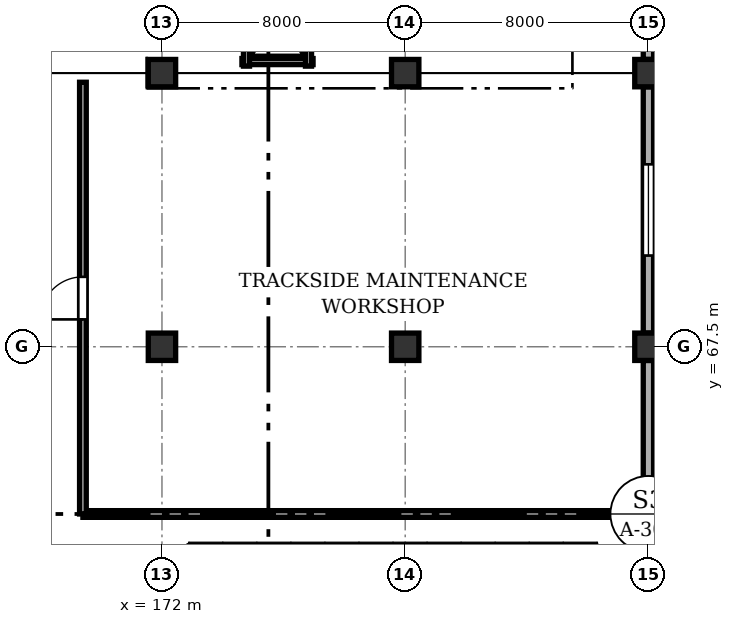
"""IFC4 building model, lengths in metres.
Left out: names, types, materials, properties, quantities, classifications, styles, units other than length and angle.
Written with IfcOpenShell. Run it as: python <this file> out.ifc"""

import sys

from ifc_helpers import new_model, si_unit, direction, frame, frame_2d, origin, origin_2d, place, context, subcontext, project, spatial, rectangle, extrude, element, fill, save


model = new_model("IFC4")
c1 = context("Model", 3, precision=1e-05, world=origin(), true_north=direction((0.0, 1.0)))
c2 = subcontext(c1, "Body", "Model", "MODEL_VIEW")
j1 = project(units=[si_unit("LENGTHUNIT", "METRE"), si_unit("PLANEANGLEUNIT", "RADIAN")], contexts=[c1])
p1 = place(None, origin())
s1 = spatial("IfcSite", under=j1, at=p1, CompositionType="ELEMENT")
p2 = place(p1, origin())
s2 = spatial("IfcBuilding", under=s1, at=p2, CompositionType="ELEMENT")
p3 = place(p2, origin())
s3 = spatial("IfcBuildingStorey", under=s2, at=p3, CompositionType="ELEMENT", Elevation=0.0)
for number, where, z_axis, x_axis in (
    (1, (172.0, 67.5, 0.0), (0.0, 0.0, 1.0), (1.0, 0.0, 0.0)),
    (2, (172.0, 76.5, 0.0), (0.0, 0.0, 1.0), (1.0, 0.0, 0.0)),
    (3, (180.0, 67.5, 0.0), (0.0, 0.0, 1.0), (1.0, 0.0, 0.0)),
    (4, (180.0, 76.5, 0.0), (0.0, 0.0, 1.0), (1.0, 0.0, 0.0)),
    (5, (188.0, 67.5, 0.0), (0.0, 0.0, 1.0), (1.0, 0.0, 0.0)),
    (6, (188.0, 76.5, 0.0), (0.0, 0.0, 1.0), (1.0, 0.0, 0.0)),
):
    element("IfcColumn", number, at=place(p3, frame(where, z_axis=z_axis, x_axis=x_axis)), inside=s3, PredefinedType="COLUMN", context=c2, shape_type="SweptSolid", body=[
        extrude(rectangle(XDim=0.9, YDim=0.9, at=origin_2d()), origin(), (0.0, 0.0, 1.0), 6.6),
    ])
p4 = place(p3, frame((188.0, 67.05, 0.0), z_axis=(0.0, 0.0, 1.0), x_axis=(0.0, -1.0, 0.0)))
e7 = element("IfcWall", 7, at=p4, inside=s3, PredefinedType="SOLIDWALL", context=c2, shape_type="SweptSolid", body=[
    extrude(rectangle(XDim=12.65, YDim=0.34, at=frame_2d((6.325, 0.0))), origin(), (0.0, 0.0, 1.0), 5.755),
])
p5 = place(p4, frame((4.2, 0.0, 0.0)))
e8 = element("IfcOpeningElement", 8, at=p5, cuts=e7, PredefinedType="OPENING", context=c2, shape_type="SweptSolid", body=[
    extrude(rectangle(XDim=4.2, YDim=3.4, at=frame_2d((2.1, 1.7))), frame((0.0, 0.18, 0.0), z_axis=(0.0, -1.0, 0.0), x_axis=(1.0, 0.0, 0.0)), (0.0, 0.0, 1.0), 0.36),
])
p6 = place(p3, frame((188.0, 76.05, 0.0), z_axis=(0.0, 0.0, 1.0), x_axis=(0.0, -1.0, 0.0)))
e9 = element("IfcWall", 9, at=p6, inside=s3, PredefinedType="SOLIDWALL", context=c2, shape_type="SweptSolid", body=[
    extrude(rectangle(XDim=8.1, YDim=0.34, at=frame_2d((4.05, 0.0))), origin(), (0.0, 0.0, 1.0), 5.755),
])
p7 = place(p6, frame((2.55, 0.0, 0.95)))
e10 = element("IfcOpeningElement", 10, at=p7, cuts=e9, PredefinedType="OPENING", context=c2, shape_type="SweptSolid", body=[
    extrude(rectangle(XDim=3.0, YDim=2.1, at=frame_2d((1.5, 1.05))), frame((0.0, 0.18, 0.0), z_axis=(0.0, -1.0, 0.0), x_axis=(1.0, 0.0, 0.0)), (0.0, 0.0, 1.0), 0.36),
])
p8 = place(p3, frame((188.0, 85.05, 0.0), z_axis=(0.0, 0.0, 1.0), x_axis=(0.0, -1.0, 0.0)))
e11 = element("IfcWall", 11, at=p8, inside=s3, PredefinedType="SOLIDWALL", context=c2, shape_type="SweptSolid", body=[
    extrude(rectangle(XDim=8.1, YDim=0.34, at=frame_2d((4.05, 0.0))), origin(), (0.0, 0.0, 1.0), 5.875),
])
p9 = place(p8, frame((2.7, 0.0, 0.95)))
e12 = element("IfcOpeningElement", 12, at=p9, cuts=e11, PredefinedType="OPENING", context=c2, shape_type="SweptSolid", body=[
    extrude(rectangle(XDim=2.7, YDim=2.1, at=frame_2d((1.35, 1.05))), frame((0.0, 0.18, 0.0), z_axis=(0.0, -1.0, 0.0), x_axis=(1.0, 0.0, 0.0)), (0.0, 0.0, 1.0), 0.36),
])
p10 = place(p3, frame((174.63, 76.88, 0.0), z_axis=(0.0, 0.0, 1.0), x_axis=(1.0, 0.0, 0.0)))
e13 = element("IfcWall", 13, at=p10, inside=s3, PredefinedType="SOLIDWALL", context=c2, shape_type="SweptSolid", body=[
    extrude(rectangle(XDim=2.34, YDim=0.2, at=frame_2d((1.17, 0.0))), origin(), (0.0, 0.0, 1.0), 4.4),
])
for number, where, z_axis, x_axis in (
    (14, (174.78, 79.87, 0.0), (0.0, 0.0, 1.0), (0.0, -1.0, 0.0)),
    (15, (176.82, 76.73, 0.0), (0.0, 0.0, 1.0), (0.0, 1.0, 0.0)),
):
    element("IfcWall", number, at=place(p3, frame(where, z_axis=z_axis, x_axis=x_axis)), inside=s3, PredefinedType="SOLIDWALL", context=c2, shape_type="SweptSolid", body=[
        extrude(rectangle(XDim=3.14, YDim=0.2, at=frame_2d((1.57, 0.0))), origin(), (0.0, 0.0, 1.0), 4.4),
    ])
p11 = place(p3, frame((187.2, 62.0, 0.0), z_axis=(0.0, 0.0, 1.0), x_axis=(-1.0, 0.0, 0.0)))
e16 = element("IfcWall", 16, at=p11, inside=s3, PredefinedType="SOLIDWALL", context=c2, shape_type="SweptSolid", body=[
    extrude(rectangle(XDim=17.8, YDim=0.22, at=frame_2d((8.9, 0.0))), origin(), (0.0, 0.0, 1.0), 4.4),
])
p12 = place(p3, frame((169.4, 62.0, 0.0), z_axis=(0.0, 0.0, 1.0), x_axis=(0.0, 1.0, 0.0)))
e17 = element("IfcWall", 17, at=p12, inside=s3, PredefinedType="SOLIDWALL", context=c2, shape_type="SweptSolid", body=[
    extrude(rectangle(XDim=14.2, YDim=0.22, at=frame_2d((7.1, 0.0))), origin(), (0.0, 0.0, 1.0), 4.4),
])
p13 = place(p12, frame((6.4, 0.0, 0.0)))
e18 = element("IfcOpeningElement", 18, at=p13, cuts=e17, PredefinedType="OPENING", context=c2, shape_type="SweptSolid", body=[
    extrude(rectangle(XDim=1.4, YDim=2.1, at=frame_2d((0.7, 1.05))), frame((0.0, 0.12, 0.0), z_axis=(0.0, -1.0, 0.0), x_axis=(1.0, 0.0, 0.0)), (0.0, 0.0, 1.0), 0.24),
])
p14 = place(p5, origin())
e19 = element("IfcDoor", 19, at=p14, inside=s3, OperationType="SLIDING_TO_LEFT", PredefinedType="GATE", context=c2, shape_type="SweptSolid", body=[
    extrude(rectangle(XDim=4.2, YDim=3.4, at=frame_2d((2.1, 1.7))), frame((0.0, 0.025, 0.0), z_axis=(0.0, -1.0, 0.0), x_axis=(1.0, 0.0, 0.0)), (0.0, 0.0, 1.0), 0.05),
])
fill(e8, e19)
p15 = place(p7, origin())
e20 = element("IfcWindow", 20, at=p15, inside=s3, PartitioningType="SINGLE_PANEL", PredefinedType="WINDOW", context=c2, shape_type="SweptSolid", body=[
    extrude(rectangle(XDim=3.0, YDim=2.1, at=frame_2d((1.5, 1.05))), frame((0.0, 0.03, 0.0), z_axis=(0.0, -1.0, 0.0), x_axis=(1.0, 0.0, 0.0)), (0.0, 0.0, 1.0), 0.06),
])
fill(e10, e20)
p16 = place(p13, origin())
e21 = element("IfcDoor", 21, at=p16, inside=s3, OperationType="SINGLE_SWING_LEFT", PredefinedType="DOOR", context=c2, shape_type="SweptSolid", body=[
    extrude(rectangle(XDim=1.4, YDim=2.1, at=frame_2d((0.7, 1.05))), frame((0.0, 0.025, 0.0), z_axis=(0.0, -1.0, 0.0), x_axis=(1.0, 0.0, 0.0)), (0.0, 0.0, 1.0), 0.05),
])
fill(e18, e21)
save(model, sys.argv[1])
